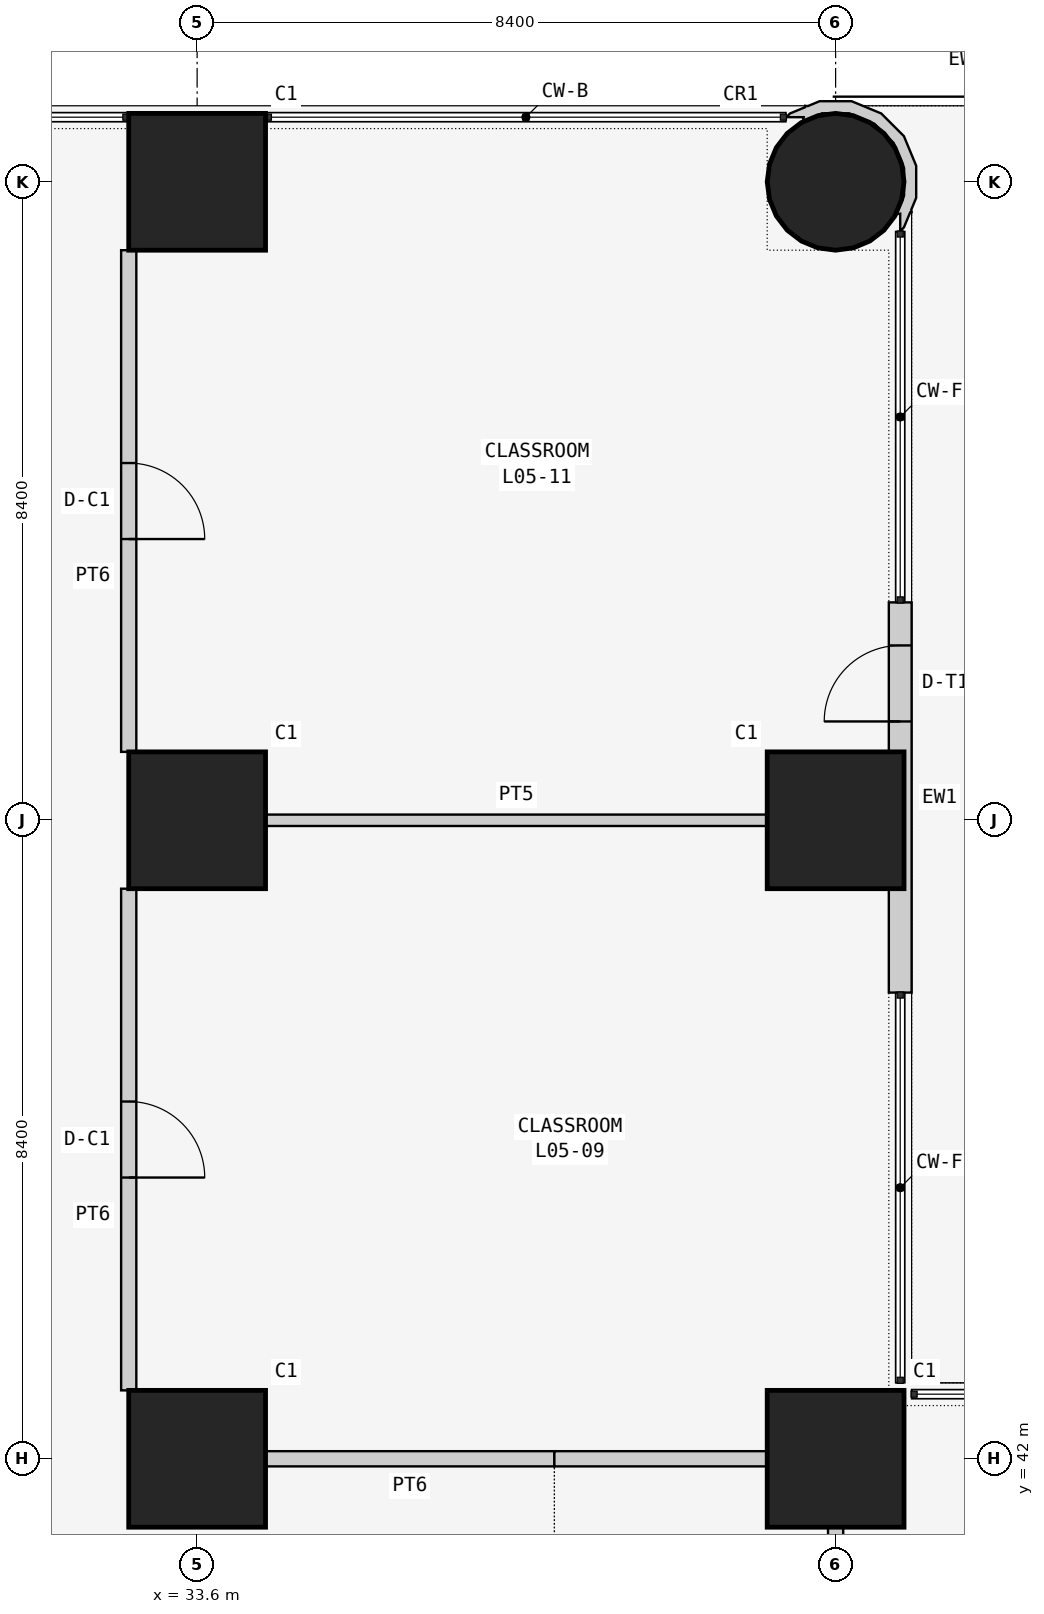
"""IFC4 building model, lengths in metres.
Left out: names, types, materials, properties, quantities, classifications, styles, units other than length and angle.
Written with IfcOpenShell. Run it as: python <this file> out.ifc"""

import sys

from ifc_helpers import new_model, si_unit, direction, frame, frame_2d, origin, origin_2d, place, context, subcontext, project, spatial, polyline, rectangle, circle, outline, extrude, element, fill, save


model = new_model("IFC4")
c1 = context("Model", 3, precision=1e-05, world=origin(), true_north=direction((0.0, 1.0)))
c2 = subcontext(c1, "Body", "Model", "MODEL_VIEW")
j1 = project(units=[si_unit("LENGTHUNIT", "METRE"), si_unit("PLANEANGLEUNIT", "RADIAN")], contexts=[c1])
p1 = place(None, origin())
s1 = spatial("IfcSite", under=j1, at=p1, CompositionType="ELEMENT")
p2 = place(p1, origin())
s2 = spatial("IfcBuilding", under=s1, at=p2, CompositionType="ELEMENT")
p3 = place(p2, frame((0.0, 0.0, 24.0)))
s3 = spatial("IfcBuildingStorey", under=s2, at=p3, CompositionType="ELEMENT", Elevation=24.0)
for number, where, z_axis, x_axis in (
    (1, (33.6, 42.0, 0.0), (0.0, 0.0, 1.0), (1.0, 0.0, 0.0)),
    (2, (33.6, 50.4, 0.0), (0.0, 0.0, 1.0), (1.0, 0.0, 0.0)),
    (3, (33.6, 58.8, 0.0), (0.0, 0.0, 1.0), (1.0, 0.0, 0.0)),
    (4, (42.0, 42.0, 0.0), (0.0, 0.0, 1.0), (1.0, 0.0, 0.0)),
    (5, (42.0, 50.4, 0.0), (0.0, 0.0, 1.0), (1.0, 0.0, 0.0)),
):
    element("IfcColumn", number, at=place(p3, frame(where, z_axis=z_axis, x_axis=x_axis)), inside=s3, PredefinedType="COLUMN", context=c2, shape_type="SweptSolid", body=[
        extrude(rectangle(XDim=1.8, YDim=1.8, at=origin_2d()), origin(), (0.0, 0.0, 1.0), 4.5),
    ])
p4 = place(p3, frame((42.0, 58.8, 0.0), z_axis=(0.0, 0.0, 1.0), x_axis=(1.0, 0.0, 0.0)))
e6 = element("IfcColumn", 6, at=p4, inside=s3, PredefinedType="COLUMN", context=c2, shape_type="SweptSolid", body=[
    extrude(circle(Radius=0.9, at=origin_2d()), origin(), (0.0, 0.0, 1.0), 4.5),
])
p5 = place(p3, frame((42.85, 48.133, 0.0), z_axis=(0.0, 0.0, 1.0), x_axis=(0.0, 1.0, 0.0)))
e7 = element("IfcWall", 7, at=p5, inside=s3, PredefinedType="SOLIDWALL", context=c2, shape_type="SweptSolid", body=[
    extrude(rectangle(XDim=5.133, YDim=0.3, at=frame_2d((2.567, 0.0))), origin(), (0.0, 0.0, 1.0), 4.25),
])
p6 = place(p5, frame((3.567, 0.0, 0.0)))
e8 = element("IfcOpeningElement", 8, at=p6, cuts=e7, PredefinedType="OPENING", context=c2, shape_type="SweptSolid", body=[
    extrude(rectangle(XDim=1.0, YDim=2.4, at=frame_2d((0.5, 1.2))), frame((0.0, 0.16, 0.0), z_axis=(0.0, -1.0, 0.0), x_axis=(1.0, 0.0, 0.0)), (0.0, 0.0, 1.0), 0.32),
])
p7 = place(p3, frame((42.779, 58.205, 0.0), z_axis=(0.0, 0.0, 1.0), x_axis=(0.707106781187, 0.707106781187, 0.0)))
e9 = element("IfcWall", 9, at=p7, inside=s3, PredefinedType="SOLIDWALL", context=c2, shape_type="SweptSolid", body=[
    extrude(outline(polyline([(0.47, 0.073), (0.768, 0.371), (0.93, 0.76), (0.93, 1.182), (0.768, 1.572), (0.47, 1.87), (0.315, 1.934), (0.294, 1.961), (0.278, 1.949), (0.081, 2.031), (0.012, 2.031), (0.174, 1.869), (0.133, 1.838), (0.38, 1.735), (0.634, 1.482), (0.771, 1.15), (0.771, 0.792), (0.634, 0.461), (0.38, 0.208), (0.133, 0.105), (0.174, 0.073), (0.012, -0.089), (0.081, -0.089), (0.279, -0.007), (0.294, -0.019), (0.315, 0.008), (0.47, 0.073)])), origin(), (0.0, 0.0, 1.0), 4.25),
])
p8 = place(p3, frame((42.0, 34.5, 0.0), z_axis=(0.0, 0.0, 1.0), x_axis=(0.0, 1.0, 0.0)))
e10 = element("IfcWall", 10, at=p8, inside=s3, PredefinedType="PARTITIONING", context=c2, shape_type="SweptSolid", body=[
    extrude(rectangle(XDim=6.6, YDim=0.2, at=frame_2d((3.3, 0.0))), origin(), (0.0, 0.0, 1.0), 3.409),
])
p9 = place(p3, frame((34.5, 50.4, 0.0), z_axis=(0.0, 0.0, 1.0), x_axis=(1.0, 0.0, 0.0)))
e11 = element("IfcWall", 11, at=p9, inside=s3, PredefinedType="PARTITIONING", context=c2, shape_type="SweptSolid", body=[
    extrude(rectangle(XDim=6.6, YDim=0.15, at=frame_2d((3.3, 0.0))), origin(), (0.0, 0.0, 1.0), 3.409),
])
p10 = place(p3, frame((32.7, 42.9, 0.0), z_axis=(0.0, 0.0, 1.0), x_axis=(0.0, 1.0, 0.0)))
e12 = element("IfcWall", 12, at=p10, inside=s3, PredefinedType="PARTITIONING", context=c2, shape_type="SweptSolid", body=[
    extrude(rectangle(XDim=6.6, YDim=0.2, at=frame_2d((3.3, 0.0))), origin(), (0.0, 0.0, 1.0), 4.25),
])
p11 = place(p10, frame((2.8, 0.0, 0.0)))
e13 = element("IfcOpeningElement", 13, at=p11, cuts=e12, PredefinedType="OPENING", context=c2, shape_type="SweptSolid", body=[
    extrude(rectangle(XDim=1.0, YDim=2.1, at=frame_2d((0.5, 1.05))), frame((0.0, 0.11, 0.0), z_axis=(0.0, -1.0, 0.0), x_axis=(1.0, 0.0, 0.0)), (0.0, 0.0, 1.0), 0.22),
])
p12 = place(p3, frame((38.3, 42.0, 0.0), z_axis=(0.0, 0.0, 1.0), x_axis=(-1.0, 0.0, 0.0)))
e14 = element("IfcWall", 14, at=p12, inside=s3, PredefinedType="PARTITIONING", context=c2, shape_type="SweptSolid", body=[
    extrude(rectangle(XDim=3.8, YDim=0.2, at=frame_2d((1.9, 0.0))), origin(), (0.0, 0.0, 1.0), 3.409),
])
p13 = place(p3, frame((41.1, 42.0, 0.0), z_axis=(0.0, 0.0, 1.0), x_axis=(-1.0, 0.0, 0.0)))
e15 = element("IfcWall", 15, at=p13, inside=s3, PredefinedType="PARTITIONING", context=c2, shape_type="SweptSolid", body=[
    extrude(rectangle(XDim=2.8, YDim=0.2, at=frame_2d((1.4, 0.0))), origin(), (0.0, 0.0, 1.0), 3.409),
])
p14 = place(p3, frame((32.7, 51.3, 0.0), z_axis=(0.0, 0.0, 1.0), x_axis=(0.0, 1.0, 0.0)))
e16 = element("IfcWall", 16, at=p14, inside=s3, PredefinedType="PARTITIONING", context=c2, shape_type="SweptSolid", body=[
    extrude(rectangle(XDim=6.6, YDim=0.2, at=frame_2d((3.3, 0.0))), origin(), (0.0, 0.0, 1.0), 4.25),
])
p15 = place(p14, frame((2.8, 0.0, 0.0)))
e17 = element("IfcOpeningElement", 17, at=p15, cuts=e16, PredefinedType="OPENING", context=c2, shape_type="SweptSolid", body=[
    extrude(rectangle(XDim=1.0, YDim=2.1, at=frame_2d((0.5, 1.05))), frame((0.0, 0.11, 0.0), z_axis=(0.0, -1.0, 0.0), x_axis=(1.0, 0.0, 0.0)), (0.0, 0.0, 1.0), 0.22),
])
p16 = place(p6, origin())
e18 = element("IfcDoor", 18, at=p16, inside=s3, OperationType="SINGLE_SWING_LEFT", PredefinedType="DOOR", context=c2, shape_type="SweptSolid", body=[
    extrude(rectangle(XDim=1.0, YDim=2.4, at=frame_2d((0.5, 1.2))), frame((0.0, 0.025, 0.0), z_axis=(0.0, -1.0, 0.0), x_axis=(1.0, 0.0, 0.0)), (0.0, 0.0, 1.0), 0.05),
])
fill(e8, e18)
p17 = place(p11, frame((1.0, 0.0, 0.0), z_axis=(0.0, 0.0, 1.0), x_axis=(-1.0, 0.0, 0.0)))
e19 = element("IfcDoor", 19, at=p17, inside=s3, OperationType="SINGLE_SWING_RIGHT", PredefinedType="DOOR", context=c2, shape_type="SweptSolid", body=[
    extrude(rectangle(XDim=1.0, YDim=2.1, at=frame_2d((0.5, 1.05))), frame((0.0, 0.025, 0.0), z_axis=(0.0, -1.0, 0.0), x_axis=(1.0, 0.0, 0.0)), (0.0, 0.0, 1.0), 0.05),
])
fill(e13, e19)
p18 = place(p15, frame((1.0, 0.0, 0.0), z_axis=(0.0, 0.0, 1.0), x_axis=(-1.0, 0.0, 0.0)))
e20 = element("IfcDoor", 20, at=p18, inside=s3, OperationType="SINGLE_SWING_RIGHT", PredefinedType="DOOR", context=c2, shape_type="SweptSolid", body=[
    extrude(rectangle(XDim=1.0, YDim=2.1, at=frame_2d((0.5, 1.05))), frame((0.0, 0.025, 0.0), z_axis=(0.0, -1.0, 0.0), x_axis=(1.0, 0.0, 0.0)), (0.0, 0.0, 1.0), 0.05),
])
fill(e17, e20)
save(model, sys.argv[1])
